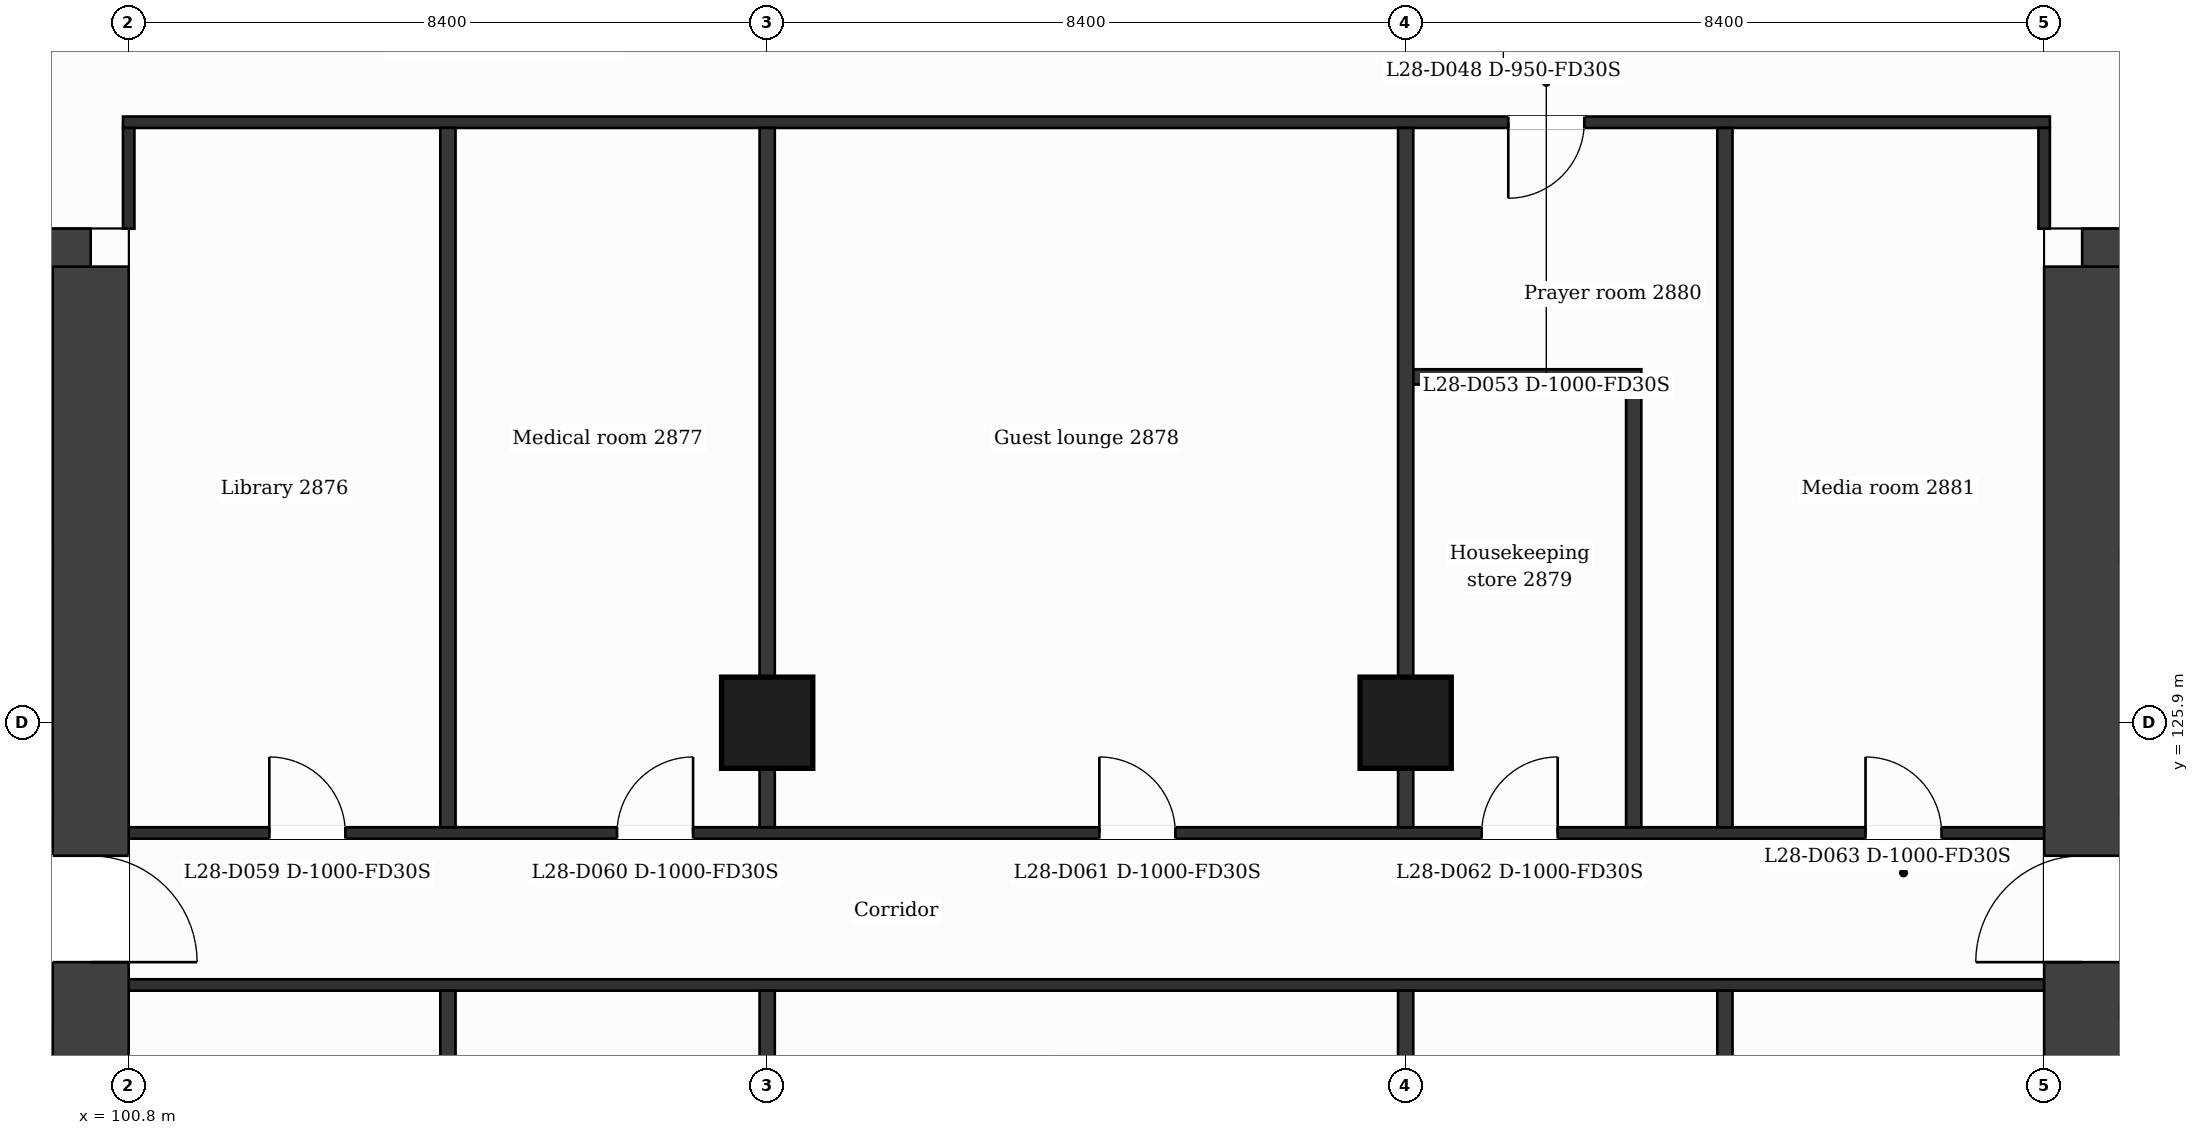
"""IFC4 building model, lengths in metres.
Left out: names, types, materials, properties, quantities, classifications, styles, units other than length and angle.
Written with IfcOpenShell. Run it as: python <this file> out.ifc"""

import sys

from ifc_helpers import new_model, si_unit, direction, frame, frame_2d, origin, origin_2d, place, context, subcontext, project, spatial, rectangle, extrude, element, fill, save


model = new_model("IFC4")
c1 = context("Model", 3, precision=1e-05, world=origin(), true_north=direction((0.0, 1.0)))
c2 = subcontext(c1, "Body", "Model", "MODEL_VIEW")
j1 = project(units=[si_unit("LENGTHUNIT", "METRE"), si_unit("PLANEANGLEUNIT", "RADIAN")], contexts=[c1])
p1 = place(None, origin())
s1 = spatial("IfcSite", under=j1, at=p1, CompositionType="ELEMENT")
p2 = place(p1, origin())
s2 = spatial("IfcBuilding", under=s1, at=p2, CompositionType="ELEMENT")
p3 = place(p2, frame((0.0, 0.0, 120.6)))
s3 = spatial("IfcBuildingStorey", under=s2, at=p3, CompositionType="ELEMENT", Elevation=120.6)
p4 = place(p3, frame((89.068, 131.9, 0.0), z_axis=(0.0, 0.0, 1.0), x_axis=(1.0, 0.0, 0.0)))
e1 = element("IfcWall", 1, at=p4, inside=s3, PredefinedType="SHEAR", context=c2, shape_type="SweptSolid", body=[
    extrude(rectangle(XDim=11.232, YDim=1.0, at=frame_2d((5.616, 0.0))), origin(), (0.0, 0.0, 1.0), 3.7),
])
p5 = place(p4, frame((6.646, 0.0, 0.0)))
e2 = element("IfcOpeningElement", 2, at=p5, cuts=e1, PredefinedType="OPENING", context=c2, shape_type="SweptSolid", body=[
    extrude(rectangle(XDim=1.2, YDim=2.1, at=frame_2d((0.6, 1.05))), frame((0.0, 0.51, 0.0), z_axis=(0.0, -1.0, 0.0), x_axis=(1.0, 0.0, 0.0)), (0.0, 0.0, 1.0), 1.02),
])
p6 = place(p3, frame((100.3, 131.9, 0.0), z_axis=(0.0, 0.0, 1.0), x_axis=(0.0, -1.0, 0.0)))
e3 = element("IfcWall", 3, at=p6, inside=s3, PredefinedType="SHEAR", context=c2, shape_type="SweptSolid", body=[
    extrude(rectangle(XDim=21.0, YDim=1.0, at=frame_2d((10.5, 0.0))), origin(), (0.0, 0.0, 1.0), 3.7),
])
p7 = place(p6, frame((7.75, 0.0, 0.0)))
e4 = element("IfcOpeningElement", 4, at=p7, cuts=e3, PredefinedType="OPENING", context=c2, shape_type="SweptSolid", body=[
    extrude(rectangle(XDim=1.4, YDim=2.1, at=frame_2d((0.7, 1.05))), frame((0.0, 0.51, 0.0), z_axis=(0.0, -1.0, 0.0), x_axis=(1.0, 0.0, 0.0)), (0.0, 0.0, 1.0), 1.02),
])
p8 = place(p3, frame((126.5, 131.9, 0.0), z_axis=(0.0, 0.0, 1.0), x_axis=(1.0, 0.0, 0.0)))
e5 = element("IfcWall", 5, at=p8, inside=s3, PredefinedType="SHEAR", context=c2, shape_type="SweptSolid", body=[
    extrude(rectangle(XDim=11.232, YDim=1.0, at=frame_2d((5.616, 0.0))), origin(), (0.0, 0.0, 1.0), 3.7),
])
p9 = place(p8, frame((3.386, 0.0, 0.0)))
e6 = element("IfcOpeningElement", 6, at=p9, cuts=e5, PredefinedType="OPENING", context=c2, shape_type="SweptSolid", body=[
    extrude(rectangle(XDim=1.2, YDim=2.1, at=frame_2d((0.6, 1.05))), frame((0.0, 0.51, 0.0), z_axis=(0.0, -1.0, 0.0), x_axis=(1.0, 0.0, 0.0)), (0.0, 0.0, 1.0), 1.02),
])
p10 = place(p3, frame((126.5, 110.9, 0.0), z_axis=(0.0, 0.0, 1.0), x_axis=(0.0, 1.0, 0.0)))
e7 = element("IfcWall", 7, at=p10, inside=s3, PredefinedType="SHEAR", context=c2, shape_type="SweptSolid", body=[
    extrude(rectangle(XDim=21.0, YDim=1.0, at=frame_2d((10.5, 0.0))), origin(), (0.0, 0.0, 1.0), 3.7),
])
p11 = place(p10, frame((11.85, 0.0, 0.0)))
e8 = element("IfcOpeningElement", 8, at=p11, cuts=e7, PredefinedType="OPENING", context=c2, shape_type="SweptSolid", body=[
    extrude(rectangle(XDim=1.4, YDim=2.1, at=frame_2d((0.7, 1.05))), frame((0.0, 0.51, 0.0), z_axis=(0.0, -1.0, 0.0), x_axis=(1.0, 0.0, 0.0)), (0.0, 0.0, 1.0), 1.02),
])
for number, where, z_axis, x_axis in (
    (9, (109.2, 125.9, 0.0), (0.0, 0.0, 1.0), (1.0, 0.0, 0.0)),
    (10, (117.6, 125.9, 0.0), (0.0, 0.0, 1.0), (1.0, 0.0, 0.0)),
):
    element("IfcColumn", number, at=place(p3, frame(where, z_axis=z_axis, x_axis=x_axis)), inside=s3, PredefinedType="COLUMN", context=c2, shape_type="SweptSolid", body=[
        extrude(rectangle(XDim=1.2, YDim=1.2, at=origin_2d()), origin(), (0.0, 0.0, 1.0), 3.7),
    ])
p12 = place(p3, frame((95.227, 122.1, 0.0), z_axis=(0.0, 0.0, 1.0), x_axis=(1.0, 0.0, 0.0)))
e11 = element("IfcWall", 11, at=p12, inside=s3, PredefinedType="PARTITIONING", context=c2, shape_type="SweptSolid", body=[
    extrude(rectangle(XDim=4.573, YDim=0.2, at=frame_2d((2.287, 0.0))), origin(), (0.0, 0.0, 1.0), 3.38),
])
p13 = place(p12, frame((2.134, 0.0, 0.0)))
e12 = element("IfcOpeningElement", 12, at=p13, cuts=e11, PredefinedType="OPENING", context=c2, shape_type="SweptSolid", body=[
    extrude(rectangle(XDim=0.9, YDim=2.1, at=frame_2d((0.45, 1.05))), frame((0.0, 0.11, 0.0), z_axis=(0.0, -1.0, 0.0), x_axis=(1.0, 0.0, 0.0)), (0.0, 0.0, 1.0), 0.22),
])
p14 = place(p3, frame((100.8, 122.45, 0.0), z_axis=(0.0, 0.0, 1.0), x_axis=(1.0, 0.0, 0.0)))
e13 = element("IfcWall", 13, at=p14, inside=s3, PredefinedType="PARTITIONING", context=c2, shape_type="SweptSolid", body=[
    extrude(rectangle(XDim=25.2, YDim=0.15, at=frame_2d((12.6, 0.0))), origin(), (0.0, 0.0, 1.0), 3.38),
])
p15 = place(p3, frame((100.8, 124.45, 0.0), z_axis=(0.0, 0.0, 1.0), x_axis=(1.0, 0.0, 0.0)))
e14 = element("IfcWall", 14, at=p15, inside=s3, PredefinedType="PARTITIONING", context=c2, shape_type="SweptSolid", body=[
    extrude(rectangle(XDim=25.2, YDim=0.15, at=frame_2d((12.6, 0.0))), origin(), (0.0, 0.0, 1.0), 3.38),
])
p16 = place(p15, frame((1.85, 0.0, 0.0)))
e15 = element("IfcOpeningElement", 15, at=p16, cuts=e14, PredefinedType="OPENING", context=c2, shape_type="SweptSolid", body=[
    extrude(rectangle(XDim=1.0, YDim=2.1, at=frame_2d((0.5, 1.05))), frame((0.0, 0.085, 0.0), z_axis=(0.0, -1.0, 0.0), x_axis=(1.0, 0.0, 0.0)), (0.0, 0.0, 1.0), 0.17),
])
p17 = place(p15, frame((6.425, 0.0, 0.0)))
e16 = element("IfcOpeningElement", 16, at=p17, cuts=e14, PredefinedType="OPENING", context=c2, shape_type="SweptSolid", body=[
    extrude(rectangle(XDim=1.0, YDim=2.1, at=frame_2d((0.5, 1.05))), frame((0.0, 0.085, 0.0), z_axis=(0.0, -1.0, 0.0), x_axis=(1.0, 0.0, 0.0)), (0.0, 0.0, 1.0), 0.17),
])
p18 = place(p15, frame((12.77, 0.0, 0.0)))
e17 = element("IfcOpeningElement", 17, at=p18, cuts=e14, PredefinedType="OPENING", context=c2, shape_type="SweptSolid", body=[
    extrude(rectangle(XDim=1.0, YDim=2.1, at=frame_2d((0.5, 1.05))), frame((0.0, 0.085, 0.0), z_axis=(0.0, -1.0, 0.0), x_axis=(1.0, 0.0, 0.0)), (0.0, 0.0, 1.0), 0.17),
])
p19 = place(p15, frame((17.8, 0.0, 0.0)))
e18 = element("IfcOpeningElement", 18, at=p19, cuts=e14, PredefinedType="OPENING", context=c2, shape_type="SweptSolid", body=[
    extrude(rectangle(XDim=1.0, YDim=2.1, at=frame_2d((0.5, 1.05))), frame((0.0, 0.085, 0.0), z_axis=(0.0, -1.0, 0.0), x_axis=(1.0, 0.0, 0.0)), (0.0, 0.0, 1.0), 0.17),
])
p20 = place(p15, frame((22.85, 0.0, 0.0)))
e19 = element("IfcOpeningElement", 19, at=p20, cuts=e14, PredefinedType="OPENING", context=c2, shape_type="SweptSolid", body=[
    extrude(rectangle(XDim=1.0, YDim=2.1, at=frame_2d((0.5, 1.05))), frame((0.0, 0.085, 0.0), z_axis=(0.0, -1.0, 0.0), x_axis=(1.0, 0.0, 0.0)), (0.0, 0.0, 1.0), 0.17),
])
p21 = place(p3, frame((127.0, 124.8, 0.0), z_axis=(0.0, 0.0, 1.0), x_axis=(1.0, 0.0, 0.0)))
e20 = element("IfcWall", 20, at=p21, inside=s3, PredefinedType="PARTITIONING", context=c2, shape_type="SweptSolid", body=[
    extrude(rectangle(XDim=4.649, YDim=0.2, at=frame_2d((2.324, 0.0))), origin(), (0.0, 0.0, 1.0), 3.38),
])
p22 = place(p21, frame((0.743, 0.0, 0.0)))
e21 = element("IfcOpeningElement", 21, at=p22, cuts=e20, PredefinedType="OPENING", context=c2, shape_type="SweptSolid", body=[
    extrude(rectangle(XDim=1.1, YDim=2.1, at=frame_2d((0.55, 1.05))), frame((0.0, 0.11, 0.0), z_axis=(0.0, -1.0, 0.0), x_axis=(1.0, 0.0, 0.0)), (0.0, 0.0, 1.0), 0.22),
])
p23 = place(p3, frame((127.0, 128.1, 0.0), z_axis=(0.0, 0.0, 1.0), x_axis=(1.0, 0.0, 0.0)))
e22 = element("IfcWall", 22, at=p23, inside=s3, PredefinedType="PARTITIONING", context=c2, shape_type="SweptSolid", body=[
    extrude(rectangle(XDim=4.649, YDim=0.2, at=frame_2d((2.324, 0.0))), origin(), (0.0, 0.0, 1.0), 3.38),
])
p24 = place(p23, frame((2.805, 0.0, 0.0)))
e23 = element("IfcOpeningElement", 23, at=p24, cuts=e22, PredefinedType="OPENING", context=c2, shape_type="SweptSolid", body=[
    extrude(rectangle(XDim=1.1, YDim=2.1, at=frame_2d((0.55, 1.05))), frame((0.0, 0.11, 0.0), z_axis=(0.0, -1.0, 0.0), x_axis=(1.0, 0.0, 0.0)), (0.0, 0.0, 1.0), 0.22),
])
p25 = place(p3, frame((117.6, 130.45, 0.0), z_axis=(0.0, 0.0, 1.0), x_axis=(1.0, 0.0, 0.0)))
e24 = element("IfcWall", 24, at=p25, inside=s3, PredefinedType="PARTITIONING", context=c2, shape_type="SweptSolid", body=[
    extrude(rectangle(XDim=3.1, YDim=0.2, at=frame_2d((1.55, 0.0))), origin(), (0.0, 0.0, 1.0), 3.38),
])
p26 = place(p3, frame((100.725, 133.8, 0.0), z_axis=(0.0, 0.0, 1.0), x_axis=(1.0, 0.0, 0.0)))
e25 = element("IfcWall", 25, at=p26, inside=s3, PredefinedType="PARTITIONING", context=c2, shape_type="SweptSolid", body=[
    extrude(rectangle(XDim=25.35, YDim=0.15, at=frame_2d((12.675, 0.0))), origin(), (0.0, 0.0, 1.0), 3.38),
])
p27 = place(p26, frame((18.225, 0.0, 0.0)))
e26 = element("IfcOpeningElement", 26, at=p27, cuts=e25, PredefinedType="OPENING", context=c2, shape_type="SweptSolid", body=[
    extrude(rectangle(XDim=1.0, YDim=2.1, at=frame_2d((0.5, 1.05))), frame((0.0, 0.085, 0.0), z_axis=(0.0, -1.0, 0.0), x_axis=(1.0, 0.0, 0.0)), (0.0, 0.0, 1.0), 0.17),
])
p28 = place(p3, frame((100.8, 132.4, 0.0), z_axis=(0.0, 0.0, 1.0), x_axis=(0.0, 1.0, 0.0)))
e27 = element("IfcWall", 27, at=p28, inside=s3, PredefinedType="PARTITIONING", context=c2, shape_type="SweptSolid", body=[
    extrude(rectangle(XDim=1.325, YDim=0.15, at=frame_2d((0.663, 0.0))), origin(), (0.0, 0.0, 1.0), 3.38),
])
p29 = place(p3, frame((105.0, 109.075, 0.0), z_axis=(0.0, 0.0, 1.0), x_axis=(0.0, 1.0, 0.0)))
e28 = element("IfcWall", 28, at=p29, inside=s3, PredefinedType="PARTITIONING", context=c2, shape_type="SweptSolid", body=[
    extrude(rectangle(XDim=13.3, YDim=0.2, at=frame_2d((6.65, 0.0))), origin(), (0.0, 0.0, 1.0), 3.38),
])
p30 = place(p3, frame((105.0, 124.525, 0.0), z_axis=(0.0, 0.0, 1.0), x_axis=(0.0, 1.0, 0.0)))
e29 = element("IfcWall", 29, at=p30, inside=s3, PredefinedType="PARTITIONING", context=c2, shape_type="SweptSolid", body=[
    extrude(rectangle(XDim=9.2, YDim=0.2, at=frame_2d((4.6, 0.0))), origin(), (0.0, 0.0, 1.0), 3.38),
])
p31 = place(p3, frame((109.2, 109.075, 0.0), z_axis=(0.0, 0.0, 1.0), x_axis=(0.0, 1.0, 0.0)))
e30 = element("IfcWall", 30, at=p31, inside=s3, PredefinedType="PARTITIONING", context=c2, shape_type="SweptSolid", body=[
    extrude(rectangle(XDim=13.3, YDim=0.2, at=frame_2d((6.65, 0.0))), origin(), (0.0, 0.0, 1.0), 3.38),
])
p32 = place(p3, frame((109.2, 124.525, 0.0), z_axis=(0.0, 0.0, 1.0), x_axis=(0.0, 1.0, 0.0)))
e31 = element("IfcWall", 31, at=p32, inside=s3, PredefinedType="PARTITIONING", context=c2, shape_type="SweptSolid", body=[
    extrude(rectangle(XDim=9.2, YDim=0.2, at=frame_2d((4.6, 0.0))), origin(), (0.0, 0.0, 1.0), 3.38),
])
p33 = place(p3, frame((117.6, 109.075, 0.0), z_axis=(0.0, 0.0, 1.0), x_axis=(0.0, 1.0, 0.0)))
e32 = element("IfcWall", 32, at=p33, inside=s3, PredefinedType="PARTITIONING", context=c2, shape_type="SweptSolid", body=[
    extrude(rectangle(XDim=13.3, YDim=0.2, at=frame_2d((6.65, 0.0))), origin(), (0.0, 0.0, 1.0), 3.38),
])
p34 = place(p3, frame((117.6, 124.525, 0.0), z_axis=(0.0, 0.0, 1.0), x_axis=(0.0, 1.0, 0.0)))
e33 = element("IfcWall", 33, at=p34, inside=s3, PredefinedType="PARTITIONING", context=c2, shape_type="SweptSolid", body=[
    extrude(rectangle(XDim=9.2, YDim=0.2, at=frame_2d((4.6, 0.0))), origin(), (0.0, 0.0, 1.0), 3.38),
])
p35 = place(p3, frame((120.6, 124.525, 0.0), z_axis=(0.0, 0.0, 1.0), x_axis=(0.0, 1.0, 0.0)))
e34 = element("IfcWall", 34, at=p35, inside=s3, PredefinedType="PARTITIONING", context=c2, shape_type="SweptSolid", body=[
    extrude(rectangle(XDim=5.825, YDim=0.2, at=frame_2d((2.913, 0.0))), origin(), (0.0, 0.0, 1.0), 3.38),
])
p36 = place(p3, frame((121.8, 109.075, 0.0), z_axis=(0.0, 0.0, 1.0), x_axis=(0.0, 1.0, 0.0)))
e35 = element("IfcWall", 35, at=p36, inside=s3, PredefinedType="PARTITIONING", context=c2, shape_type="SweptSolid", body=[
    extrude(rectangle(XDim=13.3, YDim=0.2, at=frame_2d((6.65, 0.0))), origin(), (0.0, 0.0, 1.0), 3.38),
])
p37 = place(p3, frame((121.8, 124.525, 0.0), z_axis=(0.0, 0.0, 1.0), x_axis=(0.0, 1.0, 0.0)))
e36 = element("IfcWall", 36, at=p37, inside=s3, PredefinedType="PARTITIONING", context=c2, shape_type="SweptSolid", body=[
    extrude(rectangle(XDim=9.2, YDim=0.2, at=frame_2d((4.6, 0.0))), origin(), (0.0, 0.0, 1.0), 3.38),
])
p38 = place(p3, frame((126.0, 132.4, 0.0), z_axis=(0.0, 0.0, 1.0), x_axis=(0.0, 1.0, 0.0)))
e37 = element("IfcWall", 37, at=p38, inside=s3, PredefinedType="PARTITIONING", context=c2, shape_type="SweptSolid", body=[
    extrude(rectangle(XDim=1.325, YDim=0.15, at=frame_2d((0.663, 0.0))), origin(), (0.0, 0.0, 1.0), 3.38),
])
p39 = place(p27, origin())
e38 = element("IfcDoor", 38, at=p39, inside=s3, OperationType="SINGLE_SWING_LEFT", PredefinedType="DOOR", context=c2, shape_type="SweptSolid", body=[
    extrude(rectangle(XDim=1.0, YDim=2.1, at=frame_2d((0.5, 1.05))), frame((0.0, 0.025, 0.0), z_axis=(0.0, -1.0, 0.0), x_axis=(1.0, 0.0, 0.0)), (0.0, 0.0, 1.0), 0.05),
])
fill(e26, e38)
p40 = place(p16, origin())
e39 = element("IfcDoor", 39, at=p40, inside=s3, OperationType="SINGLE_SWING_LEFT", PredefinedType="DOOR", context=c2, shape_type="SweptSolid", body=[
    extrude(rectangle(XDim=1.0, YDim=2.1, at=frame_2d((0.5, 1.05))), frame((0.0, 0.025, 0.0), z_axis=(0.0, -1.0, 0.0), x_axis=(1.0, 0.0, 0.0)), (0.0, 0.0, 1.0), 0.05),
])
fill(e15, e39)
p41 = place(p17, origin())
e40 = element("IfcDoor", 40, at=p41, inside=s3, OperationType="SINGLE_SWING_RIGHT", PredefinedType="DOOR", context=c2, shape_type="SweptSolid", body=[
    extrude(rectangle(XDim=1.0, YDim=2.1, at=frame_2d((0.5, 1.05))), frame((0.0, 0.025, 0.0), z_axis=(0.0, -1.0, 0.0), x_axis=(1.0, 0.0, 0.0)), (0.0, 0.0, 1.0), 0.05),
])
fill(e16, e40)
p42 = place(p18, origin())
e41 = element("IfcDoor", 41, at=p42, inside=s3, OperationType="SINGLE_SWING_LEFT", PredefinedType="DOOR", context=c2, shape_type="SweptSolid", body=[
    extrude(rectangle(XDim=1.0, YDim=2.1, at=frame_2d((0.5, 1.05))), frame((0.0, 0.025, 0.0), z_axis=(0.0, -1.0, 0.0), x_axis=(1.0, 0.0, 0.0)), (0.0, 0.0, 1.0), 0.05),
])
fill(e17, e41)
p43 = place(p19, origin())
e42 = element("IfcDoor", 42, at=p43, inside=s3, OperationType="SINGLE_SWING_RIGHT", PredefinedType="DOOR", context=c2, shape_type="SweptSolid", body=[
    extrude(rectangle(XDim=1.0, YDim=2.1, at=frame_2d((0.5, 1.05))), frame((0.0, 0.025, 0.0), z_axis=(0.0, -1.0, 0.0), x_axis=(1.0, 0.0, 0.0)), (0.0, 0.0, 1.0), 0.05),
])
fill(e18, e42)
p44 = place(p20, origin())
e43 = element("IfcDoor", 43, at=p44, inside=s3, OperationType="SINGLE_SWING_LEFT", PredefinedType="DOOR", context=c2, shape_type="SweptSolid", body=[
    extrude(rectangle(XDim=1.0, YDim=2.1, at=frame_2d((0.5, 1.05))), frame((0.0, 0.025, 0.0), z_axis=(0.0, -1.0, 0.0), x_axis=(1.0, 0.0, 0.0)), (0.0, 0.0, 1.0), 0.05),
])
fill(e19, e43)
p45 = place(p7, origin())
e44 = element("IfcDoor", 44, at=p45, inside=s3, OperationType="SINGLE_SWING_RIGHT", PredefinedType="DOOR", context=c2, shape_type="SweptSolid", body=[
    extrude(rectangle(XDim=1.4, YDim=2.1, at=frame_2d((0.7, 1.05))), frame((0.0, 0.025, 0.0), z_axis=(0.0, -1.0, 0.0), x_axis=(1.0, 0.0, 0.0)), (0.0, 0.0, 1.0), 0.05),
])
fill(e4, e44)
p46 = place(p11, origin())
e45 = element("IfcDoor", 45, at=p46, inside=s3, OperationType="SINGLE_SWING_LEFT", PredefinedType="DOOR", context=c2, shape_type="SweptSolid", body=[
    extrude(rectangle(XDim=1.4, YDim=2.1, at=frame_2d((0.7, 1.05))), frame((0.0, 0.025, 0.0), z_axis=(0.0, -1.0, 0.0), x_axis=(1.0, 0.0, 0.0)), (0.0, 0.0, 1.0), 0.05),
])
fill(e8, e45)
save(model, sys.argv[1])
